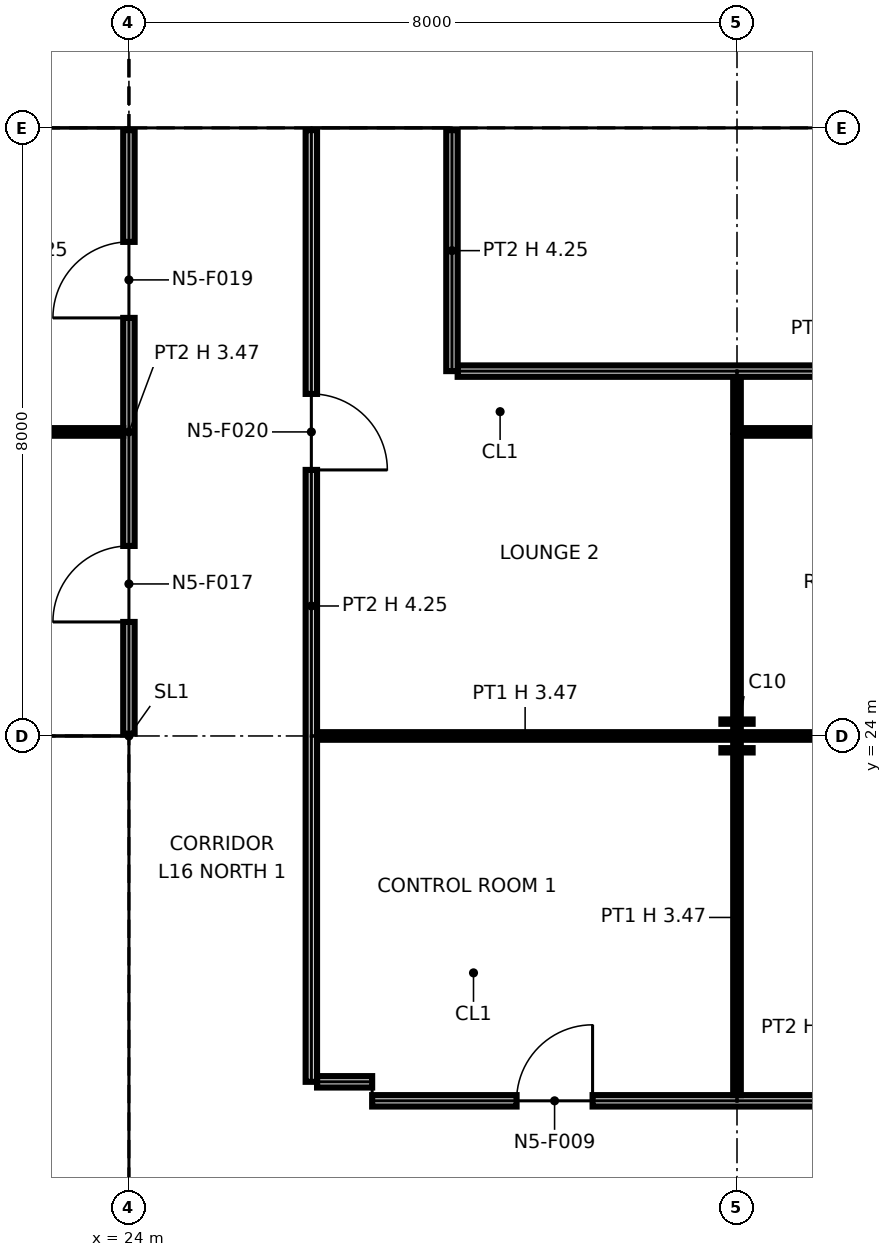
"""IFC4 building model, lengths in metres.
Left out: names, types, materials, properties, quantities, classifications, styles, units other than length and angle.
Written with IfcOpenShell. Run it as: python <this file> out.ifc"""

import sys

from ifc_helpers import new_model, si_unit, direction, frame, frame_2d, origin, origin_2d, place, context, subcontext, project, spatial, polyline, rectangle, i_section, outline, extrude, element, fill, save


model = new_model("IFC4")
c1 = context("Model", 3, precision=1e-05, world=origin(), true_north=direction((0.0, 1.0)))
c2 = subcontext(c1, "Body", "Model", "MODEL_VIEW")
j1 = project(units=[si_unit("LENGTHUNIT", "METRE"), si_unit("PLANEANGLEUNIT", "RADIAN")], contexts=[c1])
p1 = place(None, origin())
s1 = spatial("IfcSite", under=j1, at=p1, CompositionType="ELEMENT")
p2 = place(p1, origin())
s2 = spatial("IfcBuilding", under=s1, at=p2, CompositionType="ELEMENT")
p3 = place(p2, frame((0.0, 0.0, 87.6)))
s3 = spatial("IfcBuildingStorey", under=s2, at=p3, CompositionType="ELEMENT", Elevation=87.6)
p4 = place(p3, frame((24.0, 24.0, 0.0), z_axis=(0.0, 0.0, 1.0), x_axis=(1.0, 0.0, 0.0)))
e1 = element("IfcColumn", 1, at=p4, inside=s3, PredefinedType="COLUMN", context=c2, shape_type="SweptSolid", body=[
    extrude(i_section(OverallWidth=0.411, OverallDepth=0.434, WebThickness=0.036, FlangeThickness=0.057, at=origin_2d()), origin(), (0.0, 0.0, 1.0), 4.25),
])
p5 = place(p3, frame((24.0, 32.0, 0.0), z_axis=(0.0, 0.0, 1.0), x_axis=(1.0, 0.0, 0.0)))
e2 = element("IfcColumn", 2, at=p5, inside=s3, PredefinedType="COLUMN", context=c2, shape_type="SweptSolid", body=[
    extrude(i_section(OverallWidth=0.399, OverallDepth=0.386, WebThickness=0.021, FlangeThickness=0.033, at=origin_2d()), origin(), (0.0, 0.0, 1.0), 4.25),
])
p6 = place(p3, frame((32.0, 24.0, 0.0), z_axis=(0.0, 0.0, 1.0), x_axis=(1.0, 0.0, 0.0)))
e3 = element("IfcColumn", 3, at=p6, inside=s3, PredefinedType="COLUMN", context=c2, shape_type="SweptSolid", body=[
    extrude(i_section(OverallWidth=0.411, OverallDepth=0.434, WebThickness=0.036, FlangeThickness=0.057, at=origin_2d()), origin(), (0.0, 0.0, 1.0), 4.25),
])
p7 = place(p3, frame((32.0, 32.0, 0.0), z_axis=(0.0, 0.0, 1.0), x_axis=(1.0, 0.0, 0.0)))
e4 = element("IfcColumn", 4, at=p7, inside=s3, PredefinedType="COLUMN", context=c2, shape_type="SweptSolid", body=[
    extrude(i_section(OverallWidth=0.257, OverallDepth=0.363, WebThickness=0.013, FlangeThickness=0.022, at=origin_2d()), origin(), (0.0, 0.0, 1.0), 4.25),
])
p8 = place(p3, frame((8.65, 23.25, 0.0), z_axis=(0.0, 0.0, 1.0), x_axis=(1.0, 0.0, 0.0)))
e5 = element("IfcWall", 5, at=p8, inside=s3, PredefinedType="PARTITIONING", context=c2, shape_type="SweptSolid", body=[
    extrude(outline(polyline([(0.0, 0.0), (14.7, 0.0), (14.7, 4.25), (7.469, 4.25), (7.469, 3.632), (7.231, 3.632), (7.23, 4.25), (0.0, 4.25), (0.0, 0.0)])), frame((0.0, 0.1, 0.0), z_axis=(0.0, -1.0, 0.0), x_axis=(1.0, 0.0, 0.0)), (0.0, 0.0, 1.0), 0.2),
])
p9 = place(p3, frame((8.85, 19.9, 0.0), z_axis=(0.0, 0.0, 1.0), x_axis=(1.0, 0.0, 0.0)))
e6 = element("IfcWall", 6, at=p9, inside=s3, PredefinedType="PARTITIONING", context=c2, shape_type="SweptSolid", body=[
    extrude(outline(polyline([(0.0, 0.0), (14.3, 0.0), (14.3, 3.789), (7.27, 3.789), (7.269, 3.632), (7.031, 3.632), (7.031, 4.25), (0.0, 4.25), (0.0, 0.0)])), frame((0.0, 0.1, 0.0), z_axis=(0.0, -1.0, 0.0), x_axis=(1.0, 0.0, 0.0)), (0.0, 0.0, 1.0), 0.2),
])
p10 = place(p9, frame((6.3, 0.0, 0.0)))
e7 = element("IfcOpeningElement", 7, at=p10, cuts=e6, PredefinedType="OPENING", context=c2, shape_type="SweptSolid", body=[
    extrude(rectangle(XDim=0.9, YDim=2.1, at=frame_2d((0.45, 1.05))), frame((0.0, 0.11, 0.0), z_axis=(0.0, -1.0, 0.0), x_axis=(1.0, 0.0, 0.0)), (0.0, 0.0, 1.0), 0.22),
])
p11 = place(p9, frame((8.55, 0.0, 0.0)))
e8 = element("IfcOpeningElement", 8, at=p11, cuts=e6, PredefinedType="OPENING", context=c2, shape_type="SweptSolid", body=[
    extrude(rectangle(XDim=0.9, YDim=2.1, at=frame_2d((0.45, 1.05))), frame((0.0, 0.11, 0.0), z_axis=(0.0, -1.0, 0.0), x_axis=(1.0, 0.0, 0.0)), (0.0, 0.0, 1.0), 0.22),
])
p12 = place(p9, frame((10.5, 0.0, 0.0)))
e9 = element("IfcOpeningElement", 9, at=p12, cuts=e6, PredefinedType="OPENING", context=c2, shape_type="SweptSolid", body=[
    extrude(rectangle(XDim=0.9, YDim=2.1, at=frame_2d((0.45, 1.05))), frame((0.0, 0.11, 0.0), z_axis=(0.0, -1.0, 0.0), x_axis=(1.0, 0.0, 0.0)), (0.0, 0.0, 1.0), 0.22),
])
p13 = place(p9, frame((12.575, 0.0, 0.0)))
e10 = element("IfcOpeningElement", 10, at=p13, cuts=e6, PredefinedType="OPENING", context=c2, shape_type="SweptSolid", body=[
    extrude(rectangle(XDim=1.0, YDim=2.1, at=frame_2d((0.5, 1.05))), frame((0.0, 0.11, 0.0), z_axis=(0.0, -1.0, 0.0), x_axis=(1.0, 0.0, 0.0)), (0.0, 0.0, 1.0), 0.22),
])
p14 = place(p3, frame((23.25, 8.85, 0.0), z_axis=(0.0, 0.0, 1.0), x_axis=(0.0, 1.0, 0.0)))
e11 = element("IfcWall", 11, at=p14, inside=s3, PredefinedType="PARTITIONING", context=c2, shape_type="SweptSolid", body=[
    extrude(outline(polyline([(0.0, 0.0), (14.3, 0.0), (14.3, 4.25), (11.231, 4.25), (11.23, 3.789), (11.07, 3.789), (11.069, 4.25), (7.27, 4.25), (7.269, 3.632), (7.031, 3.632), (7.031, 4.25), (1.231, 4.25), (1.23, 3.789), (1.07, 3.789), (1.069, 4.25), (0.0, 4.25), (0.0, 0.0)])), frame((0.0, 0.1, 0.0), z_axis=(0.0, -1.0, 0.0), x_axis=(1.0, 0.0, 0.0)), (0.0, 0.0, 1.0), 0.2),
])
p15 = place(p14, frame((8.3, 0.0, 0.0)))
e12 = element("IfcOpeningElement", 12, at=p15, cuts=e11, PredefinedType="OPENING", context=c2, shape_type="SweptSolid", body=[
    extrude(rectangle(XDim=1.8, YDim=2.1, at=frame_2d((0.9, 1.05))), frame((0.0, 0.11, 0.0), z_axis=(0.0, -1.0, 0.0), x_axis=(1.0, 0.0, 0.0)), (0.0, 0.0, 1.0), 0.22),
])
p16 = place(p3, frame((8.65, 32.75, 0.0), z_axis=(0.0, 0.0, 1.0), x_axis=(1.0, 0.0, 0.0)))
e13 = element("IfcWall", 13, at=p16, inside=s3, PredefinedType="PARTITIONING", context=c2, shape_type="SweptSolid", body=[
    extrude(outline(polyline([(0.0, 0.0), (14.7, 0.0), (14.7, 4.25), (7.469, 4.25), (7.469, 3.632), (7.231, 3.632), (7.23, 4.25), (0.0, 4.25), (0.0, 0.0)])), frame((0.0, 0.1, 0.0), z_axis=(0.0, -1.0, 0.0), x_axis=(1.0, 0.0, 0.0)), (0.0, 0.0, 1.0), 0.2),
])
p17 = place(p16, frame((4.05, 0.0, 0.0)))
e14 = element("IfcOpeningElement", 14, at=p17, cuts=e13, PredefinedType="OPENING", context=c2, shape_type="SweptSolid", body=[
    extrude(rectangle(XDim=1.8, YDim=2.1, at=frame_2d((0.9, 1.05))), frame((0.0, 0.11, 0.0), z_axis=(0.0, -1.0, 0.0), x_axis=(1.0, 0.0, 0.0)), (0.0, 0.0, 1.0), 0.22),
])
p18 = place(p16, frame((8.35, 0.0, 0.0)))
e15 = element("IfcOpeningElement", 15, at=p18, cuts=e13, PredefinedType="OPENING", context=c2, shape_type="SweptSolid", body=[
    extrude(rectangle(XDim=1.4, YDim=2.1, at=frame_2d((0.7, 1.05))), frame((0.0, 0.11, 0.0), z_axis=(0.0, -1.0, 0.0), x_axis=(1.0, 0.0, 0.0)), (0.0, 0.0, 1.0), 0.22),
])
p19 = place(p16, frame((10.85, 0.0, 0.0)))
e16 = element("IfcOpeningElement", 16, at=p19, cuts=e13, PredefinedType="OPENING", context=c2, shape_type="SweptSolid", body=[
    extrude(rectangle(XDim=1.4, YDim=2.1, at=frame_2d((0.7, 1.05))), frame((0.0, 0.11, 0.0), z_axis=(0.0, -1.0, 0.0), x_axis=(1.0, 0.0, 0.0)), (0.0, 0.0, 1.0), 0.22),
])
p20 = place(p3, frame((23.25, 32.85, 0.0), z_axis=(0.0, 0.0, 1.0), x_axis=(0.0, 1.0, 0.0)))
e17 = element("IfcWall", 17, at=p20, inside=s3, PredefinedType="PARTITIONING", context=c2, shape_type="SweptSolid", body=[
    extrude(rectangle(XDim=6.3, YDim=0.2, at=frame_2d((3.15, 0.0))), origin(), (0.0, 0.0, 1.0), 4.25),
])
p21 = place(p3, frame((24.65, 32.75, 0.0), z_axis=(0.0, 0.0, 1.0), x_axis=(1.0, 0.0, 0.0)))
e18 = element("IfcWall", 18, at=p21, inside=s3, PredefinedType="PARTITIONING", context=c2, shape_type="SweptSolid", body=[
    extrude(outline(polyline([(0.0, 0.0), (14.7, 0.0), (14.7, 4.25), (7.469, 4.25), (7.469, 3.632), (7.231, 3.632), (7.23, 4.25), (0.0, 4.25), (0.0, 0.0)])), frame((0.0, 0.1, 0.0), z_axis=(0.0, -1.0, 0.0), x_axis=(1.0, 0.0, 0.0)), (0.0, 0.0, 1.0), 0.2),
])
p22 = place(p21, frame((4.1, 0.0, 0.0)))
e19 = element("IfcOpeningElement", 19, at=p22, cuts=e18, PredefinedType="OPENING", context=c2, shape_type="SweptSolid", body=[
    extrude(rectangle(XDim=1.8, YDim=2.1, at=frame_2d((0.9, 1.05))), frame((0.0, 0.11, 0.0), z_axis=(0.0, -1.0, 0.0), x_axis=(1.0, 0.0, 0.0)), (0.0, 0.0, 1.0), 0.22),
])
p23 = place(p21, frame((8.55, 0.0, 0.0)))
e20 = element("IfcOpeningElement", 20, at=p23, cuts=e18, PredefinedType="OPENING", context=c2, shape_type="SweptSolid", body=[
    extrude(rectangle(XDim=1.4, YDim=2.1, at=frame_2d((0.7, 1.05))), frame((0.0, 0.11, 0.0), z_axis=(0.0, -1.0, 0.0), x_axis=(1.0, 0.0, 0.0)), (0.0, 0.0, 1.0), 0.22),
])
p24 = place(p21, frame((12.0, 0.0, 0.0)))
e21 = element("IfcOpeningElement", 21, at=p24, cuts=e18, PredefinedType="OPENING", context=c2, shape_type="SweptSolid", body=[
    extrude(rectangle(XDim=1.4, YDim=2.1, at=frame_2d((0.7, 1.05))), frame((0.0, 0.11, 0.0), z_axis=(0.0, -1.0, 0.0), x_axis=(1.0, 0.0, 0.0)), (0.0, 0.0, 1.0), 0.22),
])
p25 = place(p3, frame((24.75, 32.85, 0.0), z_axis=(0.0, 0.0, 1.0), x_axis=(0.0, 1.0, 0.0)))
e22 = element("IfcWall", 22, at=p25, inside=s3, PredefinedType="PARTITIONING", context=c2, shape_type="SweptSolid", body=[
    extrude(outline(polyline([(0.0, 0.0), (6.3, 0.0), (6.3, 4.25), (3.231, 4.25), (3.23, 3.789), (3.07, 3.789), (3.069, 4.25), (0.0, 4.25), (0.0, 0.0)])), frame((0.0, 0.1, 0.0), z_axis=(0.0, -1.0, 0.0), x_axis=(1.0, 0.0, 0.0)), (0.0, 0.0, 1.0), 0.2),
])
p26 = place(p3, frame((26.875, 32.85, 0.0), z_axis=(0.0, 0.0, 1.0), x_axis=(0.0, 1.0, 0.0)))
e23 = element("IfcWall", 23, at=p26, inside=s3, PredefinedType="PARTITIONING", context=c2, shape_type="SweptSolid", body=[
    extrude(rectangle(XDim=1.95, YDim=0.15, at=frame_2d((0.975, 0.0))), origin(), (0.0, 0.0, 1.0), 4.25),
])
p27 = place(p26, frame((0.6, 0.0, 0.0)))
e24 = element("IfcOpeningElement", 24, at=p27, cuts=e23, PredefinedType="OPENING", context=c2, shape_type="SweptSolid", body=[
    extrude(rectangle(XDim=0.9, YDim=2.1, at=frame_2d((0.45, 1.05))), frame((0.0, 0.085, 0.0), z_axis=(0.0, -1.0, 0.0), x_axis=(1.0, 0.0, 0.0)), (0.0, 0.0, 1.0), 0.17),
])
p28 = place(p3, frame((30.025, 32.85, 0.0), z_axis=(0.0, 0.0, 1.0), x_axis=(0.0, 1.0, 0.0)))
e25 = element("IfcWall", 25, at=p28, inside=s3, PredefinedType="PARTITIONING", context=c2, shape_type="SweptSolid", body=[
    extrude(rectangle(XDim=2.0, YDim=0.15, at=frame_2d((1.0, 0.0))), origin(), (0.0, 0.0, 1.0), 4.25),
])
p29 = place(p28, frame((1.45, 0.0, 0.0), z_axis=(0.0, 0.0, 1.0), x_axis=(-1.0, 0.0, 0.0)))
e26 = element("IfcOpeningElement", 26, at=p29, cuts=e25, PredefinedType="OPENING", context=c2, shape_type="SweptSolid", body=[
    extrude(rectangle(XDim=0.7, YDim=2.1, at=frame_2d((0.35, 1.05))), frame((0.0, 0.085, 0.0), z_axis=(0.0, -1.0, 0.0), x_axis=(1.0, 0.0, 0.0)), (0.0, 0.0, 1.0), 0.17),
])
p30 = place(p3, frame((31.95, 32.85, 0.0), z_axis=(0.0, 0.0, 1.0), x_axis=(0.0, 1.0, 0.0)))
e27 = element("IfcWall", 27, at=p30, inside=s3, PredefinedType="PARTITIONING", context=c2, shape_type="SweptSolid", body=[
    extrude(rectangle(XDim=2.05, YDim=0.7, at=frame_2d((1.025, 0.0))), origin(), (0.0, 0.0, 1.0), 3.632),
])
p31 = place(p3, frame((27.2, 19.2, 0.0), z_axis=(0.0, 0.0, 1.0), x_axis=(1.0, 0.0, 0.0)))
e28 = element("IfcWall", 28, at=p31, inside=s3, PredefinedType="PARTITIONING", context=c2, shape_type="SweptSolid", body=[
    extrude(rectangle(XDim=12.725, YDim=0.15, at=frame_2d((6.363, 0.0))), origin(), (0.0, 0.0, 1.0), 4.25),
])
p32 = place(p31, frame((1.9, 0.0, 0.0)))
e29 = element("IfcOpeningElement", 29, at=p32, cuts=e28, PredefinedType="OPENING", context=c2, shape_type="SweptSolid", body=[
    extrude(rectangle(XDim=1.0, YDim=2.1, at=frame_2d((0.5, 1.05))), frame((0.0, 0.085, 0.0), z_axis=(0.0, -1.0, 0.0), x_axis=(1.0, 0.0, 0.0)), (0.0, 0.0, 1.0), 0.17),
])
p33 = place(p31, frame((6.3, 0.0, 0.0)))
e30 = element("IfcOpeningElement", 30, at=p33, cuts=e28, PredefinedType="OPENING", context=c2, shape_type="SweptSolid", body=[
    extrude(rectangle(XDim=1.0, YDim=2.1, at=frame_2d((0.5, 1.05))), frame((0.0, 0.085, 0.0), z_axis=(0.0, -1.0, 0.0), x_axis=(1.0, 0.0, 0.0)), (0.0, 0.0, 1.0), 0.17),
])
p34 = place(p3, frame((32.0, 19.275, 0.0), z_axis=(0.0, 0.0, 1.0), x_axis=(0.0, 1.0, 0.0)))
e31 = element("IfcWall", 31, at=p34, inside=s3, PredefinedType="PARTITIONING", context=c2, shape_type="SweptSolid", body=[
    extrude(rectangle(XDim=4.675, YDim=0.1, at=frame_2d((2.337, 0.0))), origin(), (0.0, 0.0, 1.0), 3.47),
])
p35 = place(p3, frame((26.475, 19.45, 0.0), z_axis=(0.0, 0.0, 1.0), x_axis=(1.0, 0.0, 0.0)))
e32 = element("IfcWall", 32, at=p35, inside=s3, PredefinedType="PARTITIONING", context=c2, shape_type="SweptSolid", body=[
    extrude(rectangle(XDim=0.725, YDim=0.15, at=frame_2d((0.362, 0.0))), origin(), (0.0, 0.0, 1.0), 4.25),
])
p36 = place(p3, frame((26.4, 19.45, 0.0), z_axis=(0.0, 0.0, 1.0), x_axis=(0.0, 1.0, 0.0)))
e33 = element("IfcWall", 33, at=p36, inside=s3, PredefinedType="PARTITIONING", context=c2, shape_type="SweptSolid", body=[
    extrude(outline(polyline([(0.0, 0.0), (12.52, 0.0), (12.52, 4.25), (8.85, 4.25), (8.848, 3.47), (8.252, 3.47), (8.25, 4.25), (4.85, 4.25), (4.848, 3.47), (4.252, 3.47), (4.25, 4.25), (0.85, 4.25), (0.848, 3.47), (0.252, 3.47), (0.25, 4.25), (0.0, 4.25), (0.0, 0.0)])), frame((0.0, 0.075, 0.0), z_axis=(0.0, -1.0, 0.0), x_axis=(1.0, 0.0, 0.0)), (0.0, 0.0, 1.0), 0.15),
])
p37 = place(p36, frame((9.05, 0.0, 0.0), z_axis=(0.0, 0.0, 1.0), x_axis=(-1.0, 0.0, 0.0)))
e34 = element("IfcOpeningElement", 34, at=p37, cuts=e33, PredefinedType="OPENING", context=c2, shape_type="SweptSolid", body=[
    extrude(rectangle(XDim=1.0, YDim=2.1, at=frame_2d((0.5, 1.05))), frame((0.0, 0.085, 0.0), z_axis=(0.0, -1.0, 0.0), x_axis=(1.0, 0.0, 0.0)), (0.0, 0.0, 1.0), 0.17),
])
p38 = place(p3, frame((26.475, 24.0, 0.0), z_axis=(0.0, 0.0, 1.0), x_axis=(1.0, 0.0, 0.0)))
e35 = element("IfcWall", 35, at=p38, inside=s3, PredefinedType="PARTITIONING", context=c2, shape_type="SweptSolid", body=[
    extrude(rectangle(XDim=5.475, YDim=0.1, at=frame_2d((2.737, 0.0))), origin(), (0.0, 0.0, 1.0), 3.47),
])
for number, where, z_axis, x_axis in (
    (36, (32.05, 24.0, 0.0), (0.0, 0.0, 1.0), (1.0, 0.0, 0.0)),
    (37, (32.0, 24.0, 0.0), (0.0, 0.0, 1.0), (0.0, 1.0, 0.0)),
):
    element("IfcWall", number, at=place(p3, frame(where, z_axis=z_axis, x_axis=x_axis)), inside=s3, PredefinedType="PARTITIONING", context=c2, shape_type="SweptSolid", body=[
        extrude(rectangle(XDim=3.95, YDim=0.1, at=frame_2d((1.975, 0.0))), origin(), (0.0, 0.0, 1.0), 3.47),
    ])
p39 = place(p3, frame((24.0, 24.03, 0.0), z_axis=(0.0, 0.0, 1.0), x_axis=(0.0, 1.0, 0.0)))
e38 = element("IfcWall", 38, at=p39, inside=s3, PredefinedType="PARTITIONING", context=c2, shape_type="SweptSolid", body=[
    extrude(rectangle(XDim=7.94, YDim=0.15, at=frame_2d((3.97, 0.0))), origin(), (0.0, 0.0, 1.0), 3.47),
])
p40 = place(p39, frame((1.47, 0.0, 0.0)))
e39 = element("IfcOpeningElement", 39, at=p40, cuts=e38, PredefinedType="OPENING", context=c2, shape_type="SweptSolid", body=[
    extrude(rectangle(XDim=1.0, YDim=2.1, at=frame_2d((0.5, 1.05))), frame((0.0, 0.085, 0.0), z_axis=(0.0, -1.0, 0.0), x_axis=(1.0, 0.0, 0.0)), (0.0, 0.0, 1.0), 0.17),
])
p41 = place(p39, frame((5.47, 0.0, 0.0)))
e40 = element("IfcOpeningElement", 40, at=p41, cuts=e38, PredefinedType="OPENING", context=c2, shape_type="SweptSolid", body=[
    extrude(rectangle(XDim=1.0, YDim=2.1, at=frame_2d((0.5, 1.05))), frame((0.0, 0.085, 0.0), z_axis=(0.0, -1.0, 0.0), x_axis=(1.0, 0.0, 0.0)), (0.0, 0.0, 1.0), 0.17),
])
p42 = place(p3, frame((20.5, 28.0, 0.0), z_axis=(0.0, 0.0, 1.0), x_axis=(1.0, 0.0, 0.0)))
e41 = element("IfcWall", 41, at=p42, inside=s3, PredefinedType="PARTITIONING", context=c2, shape_type="SweptSolid", body=[
    extrude(rectangle(XDim=3.425, YDim=0.1, at=frame_2d((1.712, 0.0))), origin(), (0.0, 0.0, 1.0), 3.47),
])
p43 = place(p3, frame((32.05, 28.0, 0.0), z_axis=(0.0, 0.0, 1.0), x_axis=(1.0, 0.0, 0.0)))
e42 = element("IfcWall", 42, at=p43, inside=s3, PredefinedType="PARTITIONING", context=c2, shape_type="SweptSolid", body=[
    extrude(rectangle(XDim=4.95, YDim=0.1, at=frame_2d((2.475, 0.0))), origin(), (0.0, 0.0, 1.0), 3.47),
])
p44 = place(p3, frame((32.0, 28.0, 0.0), z_axis=(0.0, 0.0, 1.0), x_axis=(0.0, 1.0, 0.0)))
e43 = element("IfcWall", 43, at=p44, inside=s3, PredefinedType="PARTITIONING", context=c2, shape_type="SweptSolid", body=[
    extrude(rectangle(XDim=0.725, YDim=0.1, at=frame_2d((0.363, 0.0))), origin(), (0.0, 0.0, 1.0), 3.47),
])
p45 = place(p3, frame((28.325, 28.8, 0.0), z_axis=(0.0, 0.0, 1.0), x_axis=(1.0, 0.0, 0.0)))
e44 = element("IfcWall", 44, at=p45, inside=s3, PredefinedType="PARTITIONING", context=c2, shape_type="SweptSolid", body=[
    extrude(rectangle(XDim=10.15, YDim=0.15, at=frame_2d((5.075, 0.0))), origin(), (0.0, 0.0, 1.0), 4.25),
])
p46 = place(p3, frame((28.25, 28.8, 0.0), z_axis=(0.0, 0.0, 1.0), x_axis=(0.0, 1.0, 0.0)))
e45 = element("IfcWall", 45, at=p46, inside=s3, PredefinedType="PARTITIONING", context=c2, shape_type="SweptSolid", body=[
    extrude(rectangle(XDim=3.17, YDim=0.15, at=frame_2d((1.585, 0.0))), origin(), (0.0, 0.0, 1.0), 4.25),
])
p47 = place(p15, origin())
e46 = element("IfcDoor", 46, at=p47, inside=s3, OperationType="DOUBLE_DOOR_SINGLE_SWING", PredefinedType="NOTDEFINED", context=c2, shape_type="SweptSolid", body=[
    extrude(rectangle(XDim=1.8, YDim=2.1, at=frame_2d((0.9, 1.05))), frame((0.0, 0.025, 0.0), z_axis=(0.0, -1.0, 0.0), x_axis=(1.0, 0.0, 0.0)), (0.0, 0.0, 1.0), 0.05),
])
fill(e12, e46)
p48 = place(p22, origin())
e47 = element("IfcDoor", 47, at=p48, inside=s3, OperationType="DOUBLE_DOOR_SINGLE_SWING", PredefinedType="NOTDEFINED", context=c2, shape_type="SweptSolid", body=[
    extrude(rectangle(XDim=1.8, YDim=2.1, at=frame_2d((0.9, 1.05))), frame((0.0, 0.025, 0.0), z_axis=(0.0, -1.0, 0.0), x_axis=(1.0, 0.0, 0.0)), (0.0, 0.0, 1.0), 0.05),
])
fill(e19, e47)
p49 = place(p32, origin())
e48 = element("IfcDoor", 48, at=p49, inside=s3, OperationType="SINGLE_SWING_RIGHT", PredefinedType="DOOR", context=c2, shape_type="SweptSolid", body=[
    extrude(rectangle(XDim=1.0, YDim=2.1, at=frame_2d((0.5, 1.05))), frame((0.0, 0.025, 0.0), z_axis=(0.0, -1.0, 0.0), x_axis=(1.0, 0.0, 0.0)), (0.0, 0.0, 1.0), 0.05),
])
fill(e29, e48)
p50 = place(p40, origin())
e49 = element("IfcDoor", 49, at=p50, inside=s3, OperationType="SINGLE_SWING_LEFT", PredefinedType="DOOR", context=c2, shape_type="SweptSolid", body=[
    extrude(rectangle(XDim=1.0, YDim=2.1, at=frame_2d((0.5, 1.05))), frame((0.0, 0.025, 0.0), z_axis=(0.0, -1.0, 0.0), x_axis=(1.0, 0.0, 0.0)), (0.0, 0.0, 1.0), 0.05),
])
fill(e39, e49)
p51 = place(p41, origin())
e50 = element("IfcDoor", 50, at=p51, inside=s3, OperationType="SINGLE_SWING_LEFT", PredefinedType="DOOR", context=c2, shape_type="SweptSolid", body=[
    extrude(rectangle(XDim=1.0, YDim=2.1, at=frame_2d((0.5, 1.05))), frame((0.0, 0.025, 0.0), z_axis=(0.0, -1.0, 0.0), x_axis=(1.0, 0.0, 0.0)), (0.0, 0.0, 1.0), 0.05),
])
fill(e40, e50)
p52 = place(p37, origin())
e51 = element("IfcDoor", 51, at=p52, inside=s3, OperationType="SINGLE_SWING_RIGHT", PredefinedType="DOOR", context=c2, shape_type="SweptSolid", body=[
    extrude(rectangle(XDim=1.0, YDim=2.1, at=frame_2d((0.5, 1.05))), frame((0.0, 0.025, 0.0), z_axis=(0.0, -1.0, 0.0), x_axis=(1.0, 0.0, 0.0)), (0.0, 0.0, 1.0), 0.05),
])
fill(e34, e51)
save(model, sys.argv[1])
